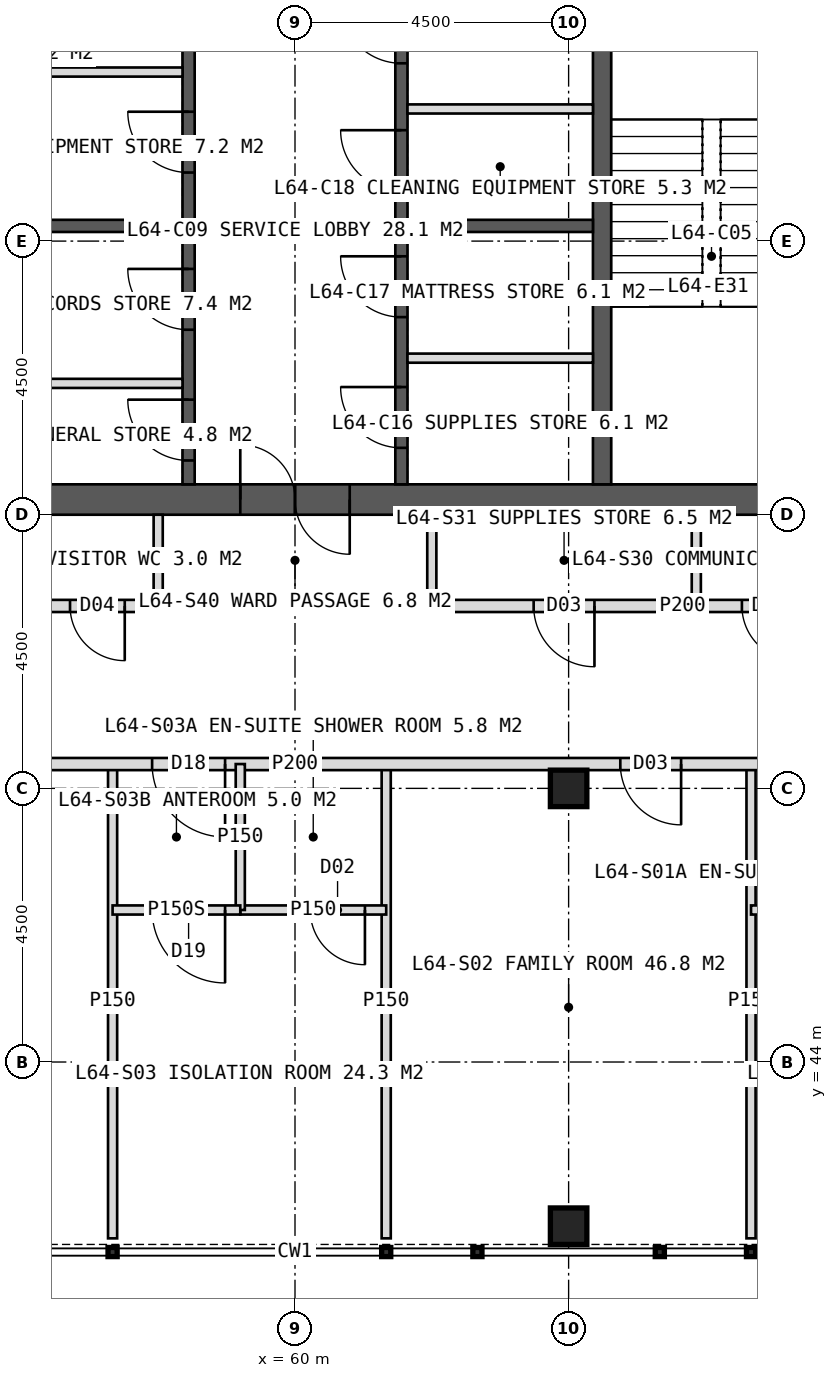
"""IFC4 building model, lengths in metres.
Left out: names, types, materials, properties, quantities, classifications, styles, units other than length and angle.
Written with IfcOpenShell. Run it as: python <this file> out.ifc"""

import sys

from ifc_helpers import new_model, si_unit, direction, frame, frame_2d, origin, origin_2d, place, context, subcontext, project, spatial, rectangle, hollow_rectangle, extrude, element, fill, save


model = new_model("IFC4")
c1 = context("Model", 3, precision=1e-05, world=origin(), true_north=direction((0.0, 1.0)))
c2 = subcontext(c1, "Body", "Model", "MODEL_VIEW")
j1 = project(units=[si_unit("LENGTHUNIT", "METRE"), si_unit("PLANEANGLEUNIT", "RADIAN")], contexts=[c1])
p1 = place(None, origin())
s1 = spatial("IfcSite", under=j1, at=p1, CompositionType="ELEMENT")
p2 = place(p1, origin())
s2 = spatial("IfcBuilding", under=s1, at=p2, CompositionType="ELEMENT")
p3 = place(p2, frame((0.0, 0.0, 266.0)))
s3 = spatial("IfcBuildingStorey", under=s2, at=p3, CompositionType="ELEMENT", Elevation=266.0)
p4 = place(p3, frame((51.0, 53.25, 0.0), z_axis=(0.0, 0.0, 1.0), x_axis=(1.0, 0.0, 0.0)))
e1 = element("IfcWall", 1, at=p4, inside=s3, PredefinedType="SHEAR", context=c2, shape_type="SweptSolid", body=[
    extrude(rectangle(XDim=18.0, YDim=0.5, at=frame_2d((9.0, 0.0))), origin(), (0.0, 0.0, 1.0), 4.0),
])
p5 = place(p4, frame((8.1, 0.0, 0.0)))
e2 = element("IfcOpeningElement", 2, at=p5, cuts=e1, PredefinedType="OPENING", context=c2, shape_type="SweptSolid", body=[
    extrude(rectangle(XDim=1.8, YDim=2.2, at=frame_2d((0.9, 1.1))), frame((0.0, 0.26, 0.0), z_axis=(0.0, -1.0, 0.0), x_axis=(1.0, 0.0, 0.0)), (0.0, 0.0, 1.0), 0.52),
])
p6 = place(p3, frame((65.05, 53.5, 0.0), z_axis=(0.0, 0.0, 1.0), x_axis=(0.0, 1.0, 0.0)))
e3 = element("IfcWall", 3, at=p6, inside=s3, PredefinedType="SHEAR", context=c2, shape_type="SweptSolid", body=[
    extrude(rectangle(XDim=17.0, YDim=0.3, at=frame_2d((8.5, 0.0))), origin(), (0.0, 0.0, 1.0), 4.0),
])
p7 = place(p3, frame((58.25, 53.5, 0.0), z_axis=(0.0, 0.0, 1.0), x_axis=(0.0, 1.0, 0.0)))
e4 = element("IfcWall", 4, at=p7, inside=s3, PredefinedType="SHEAR", context=c2, shape_type="SweptSolid", body=[
    extrude(rectangle(XDim=17.0, YDim=0.2, at=frame_2d((8.5, 0.0))), origin(), (0.0, 0.0, 1.0), 4.0),
])
p8 = place(p7, frame((0.393, 0.0, 0.0)))
e5 = element("IfcOpeningElement", 5, at=p8, cuts=e4, PredefinedType="OPENING", context=c2, shape_type="SweptSolid", body=[
    extrude(rectangle(XDim=1.0, YDim=2.1, at=frame_2d((0.5, 1.05))), frame((0.0, 0.11, 0.0), z_axis=(0.0, -1.0, 0.0), x_axis=(1.0, 0.0, 0.0)), (0.0, 0.0, 1.0), 0.22),
])
p9 = place(p7, frame((2.542, 0.0, 0.0)))
e6 = element("IfcOpeningElement", 6, at=p9, cuts=e4, PredefinedType="OPENING", context=c2, shape_type="SweptSolid", body=[
    extrude(rectangle(XDim=1.0, YDim=2.1, at=frame_2d((0.5, 1.05))), frame((0.0, 0.11, 0.0), z_axis=(0.0, -1.0, 0.0), x_axis=(1.0, 0.0, 0.0)), (0.0, 0.0, 1.0), 0.22),
])
p10 = place(p7, frame((5.127, 0.0, 0.0)))
e7 = element("IfcOpeningElement", 7, at=p10, cuts=e4, PredefinedType="OPENING", context=c2, shape_type="SweptSolid", body=[
    extrude(rectangle(XDim=1.0, YDim=2.1, at=frame_2d((0.5, 1.05))), frame((0.0, 0.11, 0.0), z_axis=(0.0, -1.0, 0.0), x_axis=(1.0, 0.0, 0.0)), (0.0, 0.0, 1.0), 0.22),
])
p11 = place(p7, frame((7.228, 0.0, 0.0)))
e8 = element("IfcOpeningElement", 8, at=p11, cuts=e4, PredefinedType="OPENING", context=c2, shape_type="SweptSolid", body=[
    extrude(rectangle(XDim=1.0, YDim=2.1, at=frame_2d((0.5, 1.05))), frame((0.0, 0.11, 0.0), z_axis=(0.0, -1.0, 0.0), x_axis=(1.0, 0.0, 0.0)), (0.0, 0.0, 1.0), 0.22),
])
p12 = place(p7, frame((10.025, 0.0, 0.0)))
e9 = element("IfcOpeningElement", 9, at=p12, cuts=e4, PredefinedType="OPENING", context=c2, shape_type="SweptSolid", body=[
    extrude(rectangle(XDim=1.4, YDim=2.2, at=frame_2d((0.7, 1.1))), frame((0.0, 0.11, 0.0), z_axis=(0.0, -1.0, 0.0), x_axis=(1.0, 0.0, 0.0)), (0.0, 0.0, 1.0), 0.22),
])
p13 = place(p7, frame((14.325, 0.0, 0.0)))
e10 = element("IfcOpeningElement", 10, at=p13, cuts=e4, PredefinedType="OPENING", context=c2, shape_type="SweptSolid", body=[
    extrude(rectangle(XDim=1.4, YDim=2.2, at=frame_2d((0.7, 1.1))), frame((0.0, 0.11, 0.0), z_axis=(0.0, -1.0, 0.0), x_axis=(1.0, 0.0, 0.0)), (0.0, 0.0, 1.0), 0.22),
])
p14 = place(p3, frame((61.75, 53.5, 0.0), z_axis=(0.0, 0.0, 1.0), x_axis=(0.0, 1.0, 0.0)))
e11 = element("IfcWall", 11, at=p14, inside=s3, PredefinedType="SHEAR", context=c2, shape_type="SweptSolid", body=[
    extrude(rectangle(XDim=17.0, YDim=0.2, at=frame_2d((8.5, 0.0))), origin(), (0.0, 0.0, 1.0), 4.0),
])
p15 = place(p14, frame((0.6, 0.0, 0.0)))
e12 = element("IfcOpeningElement", 12, at=p15, cuts=e11, PredefinedType="OPENING", context=c2, shape_type="SweptSolid", body=[
    extrude(rectangle(XDim=1.0, YDim=2.1, at=frame_2d((0.5, 1.05))), frame((0.0, 0.11, 0.0), z_axis=(0.0, -1.0, 0.0), x_axis=(1.0, 0.0, 0.0)), (0.0, 0.0, 1.0), 0.22),
])
p16 = place(p14, frame((2.75, 0.0, 0.0)))
e13 = element("IfcOpeningElement", 13, at=p16, cuts=e11, PredefinedType="OPENING", context=c2, shape_type="SweptSolid", body=[
    extrude(rectangle(XDim=1.0, YDim=2.1, at=frame_2d((0.5, 1.05))), frame((0.0, 0.11, 0.0), z_axis=(0.0, -1.0, 0.0), x_axis=(1.0, 0.0, 0.0)), (0.0, 0.0, 1.0), 0.22),
])
p17 = place(p14, frame((4.824, 0.0, 0.0)))
e14 = element("IfcOpeningElement", 14, at=p17, cuts=e11, PredefinedType="OPENING", context=c2, shape_type="SweptSolid", body=[
    extrude(rectangle(XDim=1.0, YDim=2.1, at=frame_2d((0.5, 1.05))), frame((0.0, 0.11, 0.0), z_axis=(0.0, -1.0, 0.0), x_axis=(1.0, 0.0, 0.0)), (0.0, 0.0, 1.0), 0.22),
])
p18 = place(p14, frame((6.924, 0.0, 0.0)))
e15 = element("IfcOpeningElement", 15, at=p18, cuts=e11, PredefinedType="OPENING", context=c2, shape_type="SweptSolid", body=[
    extrude(rectangle(XDim=1.0, YDim=2.1, at=frame_2d((0.5, 1.05))), frame((0.0, 0.11, 0.0), z_axis=(0.0, -1.0, 0.0), x_axis=(1.0, 0.0, 0.0)), (0.0, 0.0, 1.0), 0.22),
])
p19 = place(p14, frame((10.025, 0.0, 0.0)))
e16 = element("IfcOpeningElement", 16, at=p19, cuts=e11, PredefinedType="OPENING", context=c2, shape_type="SweptSolid", body=[
    extrude(rectangle(XDim=1.4, YDim=2.2, at=frame_2d((0.7, 1.1))), frame((0.0, 0.11, 0.0), z_axis=(0.0, -1.0, 0.0), x_axis=(1.0, 0.0, 0.0)), (0.0, 0.0, 1.0), 0.22),
])
p20 = place(p14, frame((14.325, 0.0, 0.0)))
e17 = element("IfcOpeningElement", 17, at=p20, cuts=e11, PredefinedType="OPENING", context=c2, shape_type="SweptSolid", body=[
    extrude(rectangle(XDim=1.4, YDim=2.2, at=frame_2d((0.7, 1.1))), frame((0.0, 0.11, 0.0), z_axis=(0.0, -1.0, 0.0), x_axis=(1.0, 0.0, 0.0)), (0.0, 0.0, 1.0), 0.22),
])
for number, where, z_axis, x_axis in (
    (18, (55.1, 57.75, 0.0), (0.0, 0.0, 1.0), (1.0, 0.0, 0.0)),
    (19, (61.85, 57.75, 0.0), (0.0, 0.0, 1.0), (1.0, 0.0, 0.0)),
):
    element("IfcWall", number, at=place(p3, frame(where, z_axis=z_axis, x_axis=x_axis)), inside=s3, PredefinedType="SHEAR", context=c2, shape_type="SweptSolid", body=[
        extrude(rectangle(XDim=3.05, YDim=0.2, at=frame_2d((1.525, 0.0))), origin(), (0.0, 0.0, 1.0), 4.0),
    ])
for number, where, z_axis, x_axis in (
    (20, (64.5, 48.5, 0.0), (0.0, 0.0, 1.0), (1.0, 0.0, 0.0)),
    (21, (64.5, 41.3, 0.0), (0.0, 0.0, 1.0), (1.0, 0.0, 0.0)),
):
    element("IfcColumn", number, at=place(p3, frame(where, z_axis=z_axis, x_axis=x_axis)), inside=s3, PredefinedType="COLUMN", context=c2, shape_type="SweptSolid", body=[
        extrude(hollow_rectangle(XDim=0.6, YDim=0.6, WallThickness=0.04, at=origin_2d()), origin(), (0.0, 0.0, 1.0), 4.0),
    ])
for number, where, z_axis, x_axis in (
    (22, (67.5, 48.9, 0.0), (0.0, 0.0, 1.0), (0.0, -1.0, 0.0)),
    (23, (61.5, 48.9, 0.0), (0.0, 0.0, 1.0), (0.0, -1.0, 0.0)),
    (24, (57.0, 48.9, 0.0), (0.0, 0.0, 1.0), (0.0, -1.0, 0.0)),
):
    element("IfcWall", number, at=place(p3, frame(where, z_axis=z_axis, x_axis=x_axis)), inside=s3, PredefinedType="PARTITIONING", context=c2, shape_type="SweptSolid", body=[
        extrude(rectangle(XDim=7.8, YDim=0.15, at=frame_2d((3.9, 0.0))), origin(), (0.0, 0.0, 1.0), 3.75),
    ])
p21 = place(p3, frame((73.1, 48.9, 0.0), z_axis=(0.0, 0.0, 1.0), x_axis=(-1.0, 0.0, 0.0)))
e25 = element("IfcWall", 25, at=p21, inside=s3, PredefinedType="PARTITIONING", context=c2, shape_type="SweptSolid", body=[
    extrude(rectangle(XDim=26.2, YDim=0.2, at=frame_2d((13.1, 0.0))), origin(), (0.0, 0.0, 1.0), 3.75),
])
p22 = place(p21, frame((1.75, 0.0, 0.0)))
e26 = element("IfcOpeningElement", 26, at=p22, cuts=e25, PredefinedType="OPENING", context=c2, shape_type="SweptSolid", body=[
    extrude(rectangle(XDim=1.2, YDim=2.2, at=frame_2d((0.6, 1.1))), frame((0.0, 0.11, 0.0), z_axis=(0.0, -1.0, 0.0), x_axis=(1.0, 0.0, 0.0)), (0.0, 0.0, 1.0), 0.22),
])
p23 = place(p21, frame((6.75, 0.0, 0.0)))
e27 = element("IfcOpeningElement", 27, at=p23, cuts=e25, PredefinedType="OPENING", context=c2, shape_type="SweptSolid", body=[
    extrude(rectangle(XDim=1.0, YDim=2.1, at=frame_2d((0.5, 1.05))), frame((0.0, 0.11, 0.0), z_axis=(0.0, -1.0, 0.0), x_axis=(1.0, 0.0, 0.0)), (0.0, 0.0, 1.0), 0.22),
])
p24 = place(p21, frame((14.25, 0.0, 0.0)))
e28 = element("IfcOpeningElement", 28, at=p24, cuts=e25, PredefinedType="OPENING", context=c2, shape_type="SweptSolid", body=[
    extrude(rectangle(XDim=1.2, YDim=2.2, at=frame_2d((0.6, 1.1))), frame((0.0, 0.11, 0.0), z_axis=(0.0, -1.0, 0.0), x_axis=(1.0, 0.0, 0.0)), (0.0, 0.0, 1.0), 0.22),
])
p25 = place(p21, frame((20.45, 0.0, 0.0)))
e29 = element("IfcOpeningElement", 29, at=p25, cuts=e25, PredefinedType="OPENING", context=c2, shape_type="SweptSolid", body=[
    extrude(rectangle(XDim=0.9, YDim=2.1, at=frame_2d((0.45, 1.05))), frame((0.0, 0.11, 0.0), z_axis=(0.0, -1.0, 0.0), x_axis=(1.0, 0.0, 0.0)), (0.0, 0.0, 1.0), 0.22),
])
p26 = place(p21, frame((18.45, 0.0, 0.0)))
e30 = element("IfcOpeningElement", 30, at=p26, cuts=e25, PredefinedType="OPENING", context=c2, shape_type="SweptSolid", body=[
    extrude(rectangle(XDim=1.0, YDim=2.1, at=frame_2d((0.5, 1.05))), frame((0.0, 0.11, 0.0), z_axis=(0.0, -1.0, 0.0), x_axis=(1.0, 0.0, 0.0)), (0.0, 0.0, 1.0), 0.22),
])
p27 = place(p21, frame((23.65, 0.0, 0.0)))
e31 = element("IfcOpeningElement", 31, at=p27, cuts=e25, PredefinedType="OPENING", context=c2, shape_type="SweptSolid", body=[
    extrude(rectangle(XDim=1.0, YDim=2.1, at=frame_2d((0.5, 1.05))), frame((0.0, 0.11, 0.0), z_axis=(0.0, -1.0, 0.0), x_axis=(1.0, 0.0, 0.0)), (0.0, 0.0, 1.0), 0.22),
])
p28 = place(p3, frame((69.9, 46.5, 0.0), z_axis=(0.0, 0.0, 1.0), x_axis=(-1.0, 0.0, 0.0)))
e32 = element("IfcWall", 32, at=p28, inside=s3, PredefinedType="PARTITIONING", context=c2, shape_type="SweptSolid", body=[
    extrude(rectangle(XDim=2.4, YDim=0.15, at=frame_2d((1.2, 0.0))), origin(), (0.0, 0.0, 1.0), 3.75),
])
p29 = place(p28, frame((0.35, 0.0, 0.0)))
e33 = element("IfcOpeningElement", 33, at=p29, cuts=e32, PredefinedType="OPENING", context=c2, shape_type="SweptSolid", body=[
    extrude(rectangle(XDim=0.9, YDim=2.1, at=frame_2d((0.45, 1.05))), frame((0.0, 0.085, 0.0), z_axis=(0.0, -1.0, 0.0), x_axis=(1.0, 0.0, 0.0)), (0.0, 0.0, 1.0), 0.17),
])
p30 = place(p3, frame((61.5, 46.5, 0.0), z_axis=(0.0, 0.0, 1.0), x_axis=(-1.0, 0.0, 0.0)))
e34 = element("IfcWall", 34, at=p30, inside=s3, PredefinedType="PARTITIONING", context=c2, shape_type="SweptSolid", body=[
    extrude(rectangle(XDim=2.4, YDim=0.15, at=frame_2d((1.2, 0.0))), origin(), (0.0, 0.0, 1.0), 3.75),
])
p31 = place(p30, frame((0.35, 0.0, 0.0)))
e35 = element("IfcOpeningElement", 35, at=p31, cuts=e34, PredefinedType="OPENING", context=c2, shape_type="SweptSolid", body=[
    extrude(rectangle(XDim=0.9, YDim=2.1, at=frame_2d((0.45, 1.05))), frame((0.0, 0.085, 0.0), z_axis=(0.0, -1.0, 0.0), x_axis=(1.0, 0.0, 0.0)), (0.0, 0.0, 1.0), 0.17),
])
p32 = place(p3, frame((59.1, 48.9, 0.0), z_axis=(0.0, 0.0, 1.0), x_axis=(0.0, -1.0, 0.0)))
e36 = element("IfcWall", 36, at=p32, inside=s3, PredefinedType="PARTITIONING", context=c2, shape_type="SweptSolid", body=[
    extrude(rectangle(XDim=2.4, YDim=0.15, at=frame_2d((1.2, 0.0))), origin(), (0.0, 0.0, 1.0), 3.75),
])
p33 = place(p3, frame((59.1, 46.5, 0.0), z_axis=(0.0, 0.0, 1.0), x_axis=(-1.0, 0.0, 0.0)))
e37 = element("IfcWall", 37, at=p33, inside=s3, PredefinedType="PARTITIONING", context=c2, shape_type="SweptSolid", body=[
    extrude(rectangle(XDim=2.1, YDim=0.15, at=frame_2d((1.05, 0.0))), origin(), (0.0, 0.0, 1.0), 3.75),
])
p34 = place(p33, frame((0.25, 0.0, 0.0)))
e38 = element("IfcOpeningElement", 38, at=p34, cuts=e37, PredefinedType="OPENING", context=c2, shape_type="SweptSolid", body=[
    extrude(rectangle(XDim=1.2, YDim=2.2, at=frame_2d((0.6, 1.1))), frame((0.0, 0.085, 0.0), z_axis=(0.0, -1.0, 0.0), x_axis=(1.0, 0.0, 0.0)), (0.0, 0.0, 1.0), 0.17),
])
p35 = place(p3, frame((70.5, 51.5, 0.0), z_axis=(0.0, 0.0, 1.0), x_axis=(-1.0, 0.0, 0.0)))
e39 = element("IfcWall", 39, at=p35, inside=s3, PredefinedType="PARTITIONING", context=c2, shape_type="SweptSolid", body=[
    extrude(rectangle(XDim=8.25, YDim=0.2, at=frame_2d((4.125, 0.0))), origin(), (0.0, 0.0, 1.0), 3.75),
])
p36 = place(p35, frame((2.25, 0.0, 0.0)))
e40 = element("IfcOpeningElement", 40, at=p36, cuts=e39, PredefinedType="OPENING", context=c2, shape_type="SweptSolid", body=[
    extrude(rectangle(XDim=0.9, YDim=2.1, at=frame_2d((0.45, 1.05))), frame((0.0, 0.11, 0.0), z_axis=(0.0, -1.0, 0.0), x_axis=(1.0, 0.0, 0.0)), (0.0, 0.0, 1.0), 0.22),
])
p37 = place(p35, frame((5.575, 0.0, 0.0)))
e41 = element("IfcOpeningElement", 41, at=p37, cuts=e39, PredefinedType="OPENING", context=c2, shape_type="SweptSolid", body=[
    extrude(rectangle(XDim=1.0, YDim=2.1, at=frame_2d((0.5, 1.05))), frame((0.0, 0.11, 0.0), z_axis=(0.0, -1.0, 0.0), x_axis=(1.0, 0.0, 0.0)), (0.0, 0.0, 1.0), 0.22),
])
p38 = place(p3, frame((57.75, 51.5, 0.0), z_axis=(0.0, 0.0, 1.0), x_axis=(-1.0, 0.0, 0.0)))
e42 = element("IfcWall", 42, at=p38, inside=s3, PredefinedType="PARTITIONING", context=c2, shape_type="SweptSolid", body=[
    extrude(rectangle(XDim=8.25, YDim=0.2, at=frame_2d((4.125, 0.0))), origin(), (0.0, 0.0, 1.0), 3.75),
])
p39 = place(p38, frame((0.55, 0.0, 0.0)))
e43 = element("IfcOpeningElement", 43, at=p39, cuts=e42, PredefinedType="OPENING", context=c2, shape_type="SweptSolid", body=[
    extrude(rectangle(XDim=0.9, YDim=2.1, at=frame_2d((0.45, 1.05))), frame((0.0, 0.11, 0.0), z_axis=(0.0, -1.0, 0.0), x_axis=(1.0, 0.0, 0.0)), (0.0, 0.0, 1.0), 0.22),
])
p40 = place(p38, frame((4.625, 0.0, 0.0)))
e44 = element("IfcOpeningElement", 44, at=p40, cuts=e42, PredefinedType="OPENING", context=c2, shape_type="SweptSolid", body=[
    extrude(rectangle(XDim=1.0, YDim=2.1, at=frame_2d((0.5, 1.05))), frame((0.0, 0.11, 0.0), z_axis=(0.0, -1.0, 0.0), x_axis=(1.0, 0.0, 0.0)), (0.0, 0.0, 1.0), 0.22),
])
for number, where, z_axis, x_axis in (
    (45, (62.25, 53.0, 0.0), (0.0, 0.0, 1.0), (0.0, -1.0, 0.0)),
    (46, (57.75, 53.0, 0.0), (0.0, 0.0, 1.0), (0.0, -1.0, 0.0)),
    (47, (66.6, 53.0, 0.0), (0.0, 0.0, 1.0), (0.0, -1.0, 0.0)),
):
    element("IfcWall", number, at=place(p3, frame(where, z_axis=z_axis, x_axis=x_axis)), inside=s3, PredefinedType="PARTITIONING", context=c2, shape_type="SweptSolid", body=[
        extrude(rectangle(XDim=1.5, YDim=0.15, at=frame_2d((0.75, 0.0))), origin(), (0.0, 0.0, 1.0), 3.75),
    ])
for number, where, z_axis, x_axis in (
    (48, (55.1, 55.16, 0.0), (0.0, 0.0, 1.0), (1.0, 0.0, 0.0)),
    (49, (61.85, 55.575, 0.0), (0.0, 0.0, 1.0), (1.0, 0.0, 0.0)),
    (50, (55.1, 60.28, 0.0), (0.0, 0.0, 1.0), (1.0, 0.0, 0.0)),
    (51, (61.85, 59.673, 0.0), (0.0, 0.0, 1.0), (1.0, 0.0, 0.0)),
):
    element("IfcWall", number, at=place(p3, frame(where, z_axis=z_axis, x_axis=x_axis)), inside=s3, PredefinedType="PARTITIONING", context=c2, shape_type="SweptSolid", body=[
        extrude(rectangle(XDim=3.05, YDim=0.15, at=frame_2d((1.525, 0.0))), origin(), (0.0, 0.0, 1.0), 3.75),
    ])
p41 = place(p23, origin())
e52 = element("IfcDoor", 52, at=p41, inside=s3, OperationType="SINGLE_SWING_LEFT", PredefinedType="DOOR", context=c2, shape_type="SweptSolid", body=[
    extrude(rectangle(XDim=1.0, YDim=2.1, at=frame_2d((0.5, 1.05))), frame((0.0, 0.025, 0.0), z_axis=(0.0, -1.0, 0.0), x_axis=(1.0, 0.0, 0.0)), (0.0, 0.0, 1.0), 0.05),
])
fill(e27, e52)
p42 = place(p34, origin())
e53 = element("IfcDoor", 53, at=p42, inside=s3, OperationType="SINGLE_SWING_LEFT", PredefinedType="DOOR", context=c2, shape_type="SweptSolid", body=[
    extrude(rectangle(XDim=1.2, YDim=2.2, at=frame_2d((0.6, 1.1))), frame((0.0, 0.025, 0.0), z_axis=(0.0, -1.0, 0.0), x_axis=(1.0, 0.0, 0.0)), (0.0, 0.0, 1.0), 0.05),
])
fill(e38, e53)
p43 = place(p24, origin())
e54 = element("IfcDoor", 54, at=p43, inside=s3, OperationType="SINGLE_SWING_LEFT", PredefinedType="DOOR", context=c2, shape_type="SweptSolid", body=[
    extrude(rectangle(XDim=1.2, YDim=2.2, at=frame_2d((0.6, 1.1))), frame((0.0, 0.025, 0.0), z_axis=(0.0, -1.0, 0.0), x_axis=(1.0, 0.0, 0.0)), (0.0, 0.0, 1.0), 0.05),
])
fill(e28, e54)
p44 = place(p31, origin())
e55 = element("IfcDoor", 55, at=p44, inside=s3, OperationType="SINGLE_SWING_LEFT", PredefinedType="DOOR", context=c2, shape_type="SweptSolid", body=[
    extrude(rectangle(XDim=0.9, YDim=2.1, at=frame_2d((0.45, 1.05))), frame((0.0, 0.025, 0.0), z_axis=(0.0, -1.0, 0.0), x_axis=(1.0, 0.0, 0.0)), (0.0, 0.0, 1.0), 0.05),
])
fill(e35, e55)
p45 = place(p36, origin())
e56 = element("IfcDoor", 56, at=p45, inside=s3, OperationType="SINGLE_SWING_LEFT", PredefinedType="DOOR", context=c2, shape_type="SweptSolid", body=[
    extrude(rectangle(XDim=0.9, YDim=2.1, at=frame_2d((0.45, 1.05))), frame((0.0, 0.025, 0.0), z_axis=(0.0, -1.0, 0.0), x_axis=(1.0, 0.0, 0.0)), (0.0, 0.0, 1.0), 0.05),
])
fill(e40, e56)
p46 = place(p37, origin())
e57 = element("IfcDoor", 57, at=p46, inside=s3, OperationType="SINGLE_SWING_LEFT", PredefinedType="DOOR", context=c2, shape_type="SweptSolid", body=[
    extrude(rectangle(XDim=1.0, YDim=2.1, at=frame_2d((0.5, 1.05))), frame((0.0, 0.025, 0.0), z_axis=(0.0, -1.0, 0.0), x_axis=(1.0, 0.0, 0.0)), (0.0, 0.0, 1.0), 0.05),
])
fill(e41, e57)
p47 = place(p39, origin())
e58 = element("IfcDoor", 58, at=p47, inside=s3, OperationType="SINGLE_SWING_LEFT", PredefinedType="DOOR", context=c2, shape_type="SweptSolid", body=[
    extrude(rectangle(XDim=0.9, YDim=2.1, at=frame_2d((0.45, 1.05))), frame((0.0, 0.025, 0.0), z_axis=(0.0, -1.0, 0.0), x_axis=(1.0, 0.0, 0.0)), (0.0, 0.0, 1.0), 0.05),
])
fill(e43, e58)
p48 = place(p8, origin())
e59 = element("IfcDoor", 59, at=p48, inside=s3, OperationType="SINGLE_SWING_RIGHT", PredefinedType="DOOR", context=c2, shape_type="SweptSolid", body=[
    extrude(rectangle(XDim=1.0, YDim=2.1, at=frame_2d((0.5, 1.05))), frame((0.0, 0.025, 0.0), z_axis=(0.0, -1.0, 0.0), x_axis=(1.0, 0.0, 0.0)), (0.0, 0.0, 1.0), 0.05),
])
fill(e5, e59)
p49 = place(p9, origin())
e60 = element("IfcDoor", 60, at=p49, inside=s3, OperationType="SINGLE_SWING_RIGHT", PredefinedType="DOOR", context=c2, shape_type="SweptSolid", body=[
    extrude(rectangle(XDim=1.0, YDim=2.1, at=frame_2d((0.5, 1.05))), frame((0.0, 0.025, 0.0), z_axis=(0.0, -1.0, 0.0), x_axis=(1.0, 0.0, 0.0)), (0.0, 0.0, 1.0), 0.05),
])
fill(e6, e60)
p50 = place(p15, origin())
e61 = element("IfcDoor", 61, at=p50, inside=s3, OperationType="SINGLE_SWING_RIGHT", PredefinedType="DOOR", context=c2, shape_type="SweptSolid", body=[
    extrude(rectangle(XDim=1.0, YDim=2.1, at=frame_2d((0.5, 1.05))), frame((0.0, 0.025, 0.0), z_axis=(0.0, -1.0, 0.0), x_axis=(1.0, 0.0, 0.0)), (0.0, 0.0, 1.0), 0.05),
])
fill(e12, e61)
p51 = place(p16, origin())
e62 = element("IfcDoor", 62, at=p51, inside=s3, OperationType="SINGLE_SWING_RIGHT", PredefinedType="DOOR", context=c2, shape_type="SweptSolid", body=[
    extrude(rectangle(XDim=1.0, YDim=2.1, at=frame_2d((0.5, 1.05))), frame((0.0, 0.025, 0.0), z_axis=(0.0, -1.0, 0.0), x_axis=(1.0, 0.0, 0.0)), (0.0, 0.0, 1.0), 0.05),
])
fill(e13, e62)
p52 = place(p10, origin())
e63 = element("IfcDoor", 63, at=p52, inside=s3, OperationType="SINGLE_SWING_RIGHT", PredefinedType="DOOR", context=c2, shape_type="SweptSolid", body=[
    extrude(rectangle(XDim=1.0, YDim=2.1, at=frame_2d((0.5, 1.05))), frame((0.0, 0.025, 0.0), z_axis=(0.0, -1.0, 0.0), x_axis=(1.0, 0.0, 0.0)), (0.0, 0.0, 1.0), 0.05),
])
fill(e7, e63)
p53 = place(p17, origin())
e64 = element("IfcDoor", 64, at=p53, inside=s3, OperationType="SINGLE_SWING_RIGHT", PredefinedType="DOOR", context=c2, shape_type="SweptSolid", body=[
    extrude(rectangle(XDim=1.0, YDim=2.1, at=frame_2d((0.5, 1.05))), frame((0.0, 0.025, 0.0), z_axis=(0.0, -1.0, 0.0), x_axis=(1.0, 0.0, 0.0)), (0.0, 0.0, 1.0), 0.05),
])
fill(e14, e64)
p54 = place(p18, origin())
e65 = element("IfcDoor", 65, at=p54, inside=s3, OperationType="SINGLE_SWING_RIGHT", PredefinedType="DOOR", context=c2, shape_type="SweptSolid", body=[
    extrude(rectangle(XDim=1.0, YDim=2.1, at=frame_2d((0.5, 1.05))), frame((0.0, 0.025, 0.0), z_axis=(0.0, -1.0, 0.0), x_axis=(1.0, 0.0, 0.0)), (0.0, 0.0, 1.0), 0.05),
])
fill(e15, e65)
p55 = place(p5, origin())
e66 = element("IfcDoor", 66, at=p55, inside=s3, OperationType="DOUBLE_DOOR_SINGLE_SWING", PredefinedType="DOOR", context=c2, shape_type="SweptSolid", body=[
    extrude(rectangle(XDim=1.8, YDim=2.2, at=frame_2d((0.9, 1.1))), frame((0.0, 0.025, 0.0), z_axis=(0.0, -1.0, 0.0), x_axis=(1.0, 0.0, 0.0)), (0.0, 0.0, 1.0), 0.05),
])
fill(e2, e66)
save(model, sys.argv[1])
